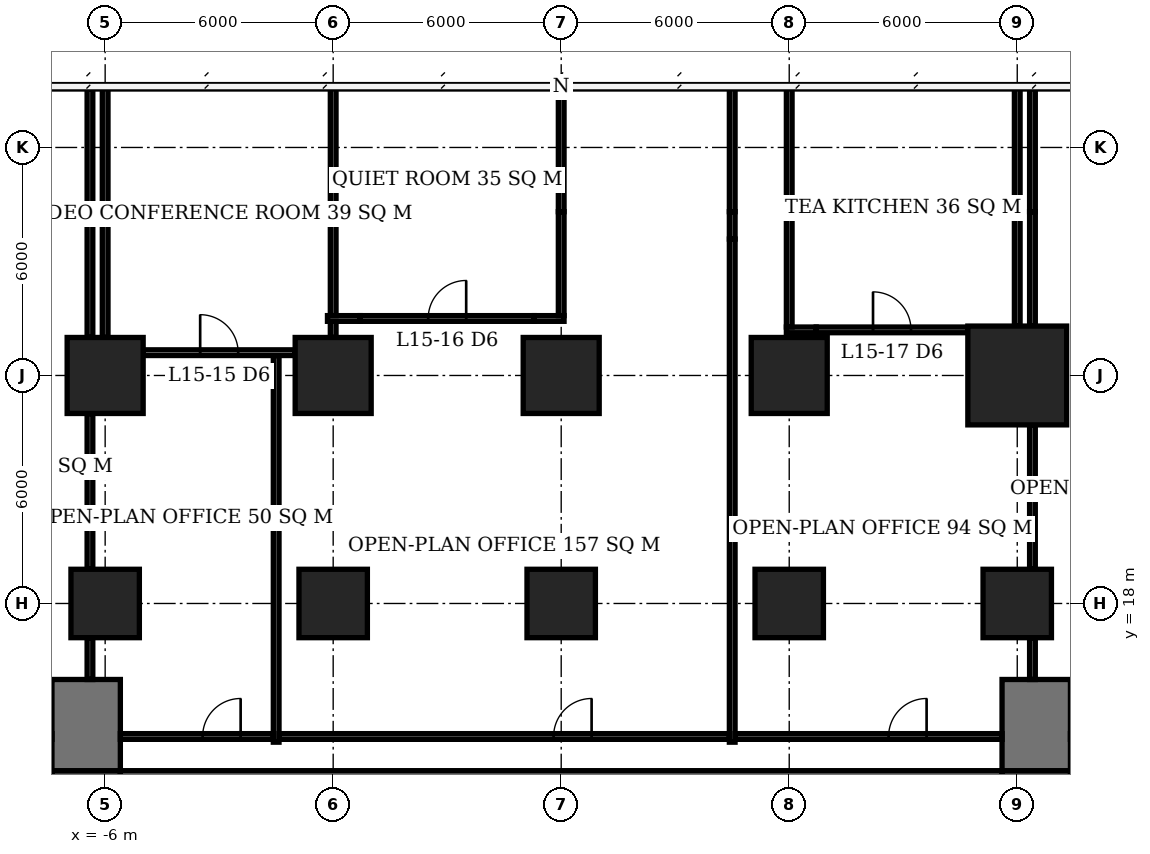
"""IFC4 building model, lengths in metres.
Left out: names, types, materials, properties, quantities, classifications, styles, units other than length and angle.
Written with IfcOpenShell. Run it as: python <this file> out.ifc"""

import sys

from ifc_helpers import new_model, si_unit, direction, frame, frame_2d, origin, origin_2d, place, context, subcontext, project, spatial, rectangle, extrude, element, fill, save


model = new_model("IFC4")
c1 = context("Model", 3, precision=1e-05, world=origin(), true_north=direction((0.0, 1.0)))
c2 = subcontext(c1, "Body", "Model", "MODEL_VIEW")
j1 = project(units=[si_unit("LENGTHUNIT", "METRE"), si_unit("PLANEANGLEUNIT", "RADIAN")], contexts=[c1])
p1 = place(None, origin())
s1 = spatial("IfcSite", under=j1, at=p1, CompositionType="ELEMENT")
p2 = place(p1, origin())
s2 = spatial("IfcBuilding", under=s1, at=p2, CompositionType="ELEMENT")
p3 = place(p2, frame((0.0, 0.0, 65.0)))
s3 = spatial("IfcBuildingStorey", under=s2, at=p3, CompositionType="ELEMENT", Elevation=65.0)
p4 = place(p3, frame((-6.0, 18.0, 0.0), z_axis=(0.0, 0.0, 1.0), x_axis=(1.0, 0.0, 0.0)))
e1 = element("IfcColumn", 1, at=p4, inside=s3, PredefinedType="COLUMN", context=c2, shape_type="SweptSolid", body=[
    extrude(rectangle(XDim=1.8, YDim=1.8, at=origin_2d()), origin(), (0.0, 0.0, 1.0), 3.9),
])
p5 = place(p3, frame((-6.0, 24.0, 0.0), z_axis=(0.0, 0.0, 1.0), x_axis=(1.0, 0.0, 0.0)))
e2 = element("IfcColumn", 2, at=p5, inside=s3, PredefinedType="COLUMN", context=c2, shape_type="SweptSolid", body=[
    extrude(rectangle(XDim=2.0, YDim=2.0, at=origin_2d()), origin(), (0.0, 0.0, 1.0), 3.9),
])
p6 = place(p3, frame((0.0, 18.0, 0.0), z_axis=(0.0, 0.0, 1.0), x_axis=(1.0, 0.0, 0.0)))
e3 = element("IfcColumn", 3, at=p6, inside=s3, PredefinedType="COLUMN", context=c2, shape_type="SweptSolid", body=[
    extrude(rectangle(XDim=1.8, YDim=1.8, at=origin_2d()), origin(), (0.0, 0.0, 1.0), 3.9),
])
p7 = place(p3, frame((0.0, 24.0, 0.0), z_axis=(0.0, 0.0, 1.0), x_axis=(1.0, 0.0, 0.0)))
e4 = element("IfcColumn", 4, at=p7, inside=s3, PredefinedType="COLUMN", context=c2, shape_type="SweptSolid", body=[
    extrude(rectangle(XDim=2.0, YDim=2.0, at=origin_2d()), origin(), (0.0, 0.0, 1.0), 3.9),
])
p8 = place(p3, frame((6.0, 18.0, 0.0), z_axis=(0.0, 0.0, 1.0), x_axis=(1.0, 0.0, 0.0)))
e5 = element("IfcColumn", 5, at=p8, inside=s3, PredefinedType="COLUMN", context=c2, shape_type="SweptSolid", body=[
    extrude(rectangle(XDim=1.8, YDim=1.8, at=origin_2d()), origin(), (0.0, 0.0, 1.0), 3.9),
])
p9 = place(p3, frame((6.0, 24.0, 0.0), z_axis=(0.0, 0.0, 1.0), x_axis=(1.0, 0.0, 0.0)))
e6 = element("IfcColumn", 6, at=p9, inside=s3, PredefinedType="COLUMN", context=c2, shape_type="SweptSolid", body=[
    extrude(rectangle(XDim=2.0, YDim=2.0, at=origin_2d()), origin(), (0.0, 0.0, 1.0), 3.9),
])
p10 = place(p3, frame((12.0, 18.0, 0.0), z_axis=(0.0, 0.0, 1.0), x_axis=(1.0, 0.0, 0.0)))
e7 = element("IfcColumn", 7, at=p10, inside=s3, PredefinedType="COLUMN", context=c2, shape_type="SweptSolid", body=[
    extrude(rectangle(XDim=1.8, YDim=1.8, at=origin_2d()), origin(), (0.0, 0.0, 1.0), 3.9),
])
p11 = place(p3, frame((12.0, 24.0, 0.0), z_axis=(0.0, 0.0, 1.0), x_axis=(1.0, 0.0, 0.0)))
e8 = element("IfcColumn", 8, at=p11, inside=s3, PredefinedType="COLUMN", context=c2, shape_type="SweptSolid", body=[
    extrude(rectangle(XDim=2.0, YDim=2.0, at=origin_2d()), origin(), (0.0, 0.0, 1.0), 3.9),
])
p12 = place(p3, frame((18.0, 18.0, 0.0), z_axis=(0.0, 0.0, 1.0), x_axis=(1.0, 0.0, 0.0)))
e9 = element("IfcColumn", 9, at=p12, inside=s3, PredefinedType="COLUMN", context=c2, shape_type="SweptSolid", body=[
    extrude(rectangle(XDim=1.8, YDim=1.8, at=origin_2d()), origin(), (0.0, 0.0, 1.0), 3.9),
])
p13 = place(p3, frame((18.0, 24.0, 0.0), z_axis=(0.0, 0.0, 1.0), x_axis=(1.0, 0.0, 0.0)))
e10 = element("IfcColumn", 10, at=p13, inside=s3, PredefinedType="COLUMN", context=c2, shape_type="SweptSolid", body=[
    extrude(rectangle(XDim=2.6, YDim=2.6, at=origin_2d()), origin(), (0.0, 0.0, 1.0), 3.9),
])
p14 = place(p3, frame((-5.6, 12.6, 0.0), z_axis=(0.0, 0.0, 1.0), x_axis=(1.0, 0.0, 0.0)))
e11 = element("IfcWall", 11, at=p14, inside=s3, PredefinedType="SHEAR", context=c2, shape_type="SweptSolid", body=[
    extrude(rectangle(XDim=23.2, YDim=2.0, at=frame_2d((11.6, 0.0))), origin(), (0.0, 0.0, 1.0), 3.9),
])
p15 = place(p3, frame((-6.5, -7.6, 0.0), z_axis=(0.0, 0.0, 1.0), x_axis=(0.0, 1.0, 0.0)))
e12 = element("IfcWall", 12, at=p15, inside=s3, PredefinedType="SHEAR", context=c2, shape_type="SweptSolid", body=[
    extrude(rectangle(XDim=21.2, YDim=1.8, at=frame_2d((10.6, 0.0))), origin(), (0.0, 0.0, 1.0), 3.9),
])
p16 = place(p15, frame((7.8, 0.0, 0.0)))
e13 = element("IfcOpeningElement", 13, at=p16, cuts=e12, PredefinedType="OPENING", context=c2, shape_type="SweptSolid", body=[
    extrude(rectangle(XDim=1.8, YDim=2.4, at=frame_2d((0.9, 1.2))), frame((0.0, 0.91, 0.0), z_axis=(0.0, -1.0, 0.0), x_axis=(1.0, 0.0, 0.0)), (0.0, 0.0, 1.0), 1.82),
])
p17 = place(p3, frame((18.5, -7.6, 0.0), z_axis=(0.0, 0.0, 1.0), x_axis=(0.0, 1.0, 0.0)))
e14 = element("IfcWall", 14, at=p17, inside=s3, PredefinedType="SHEAR", context=c2, shape_type="SweptSolid", body=[
    extrude(rectangle(XDim=21.2, YDim=1.8, at=frame_2d((10.6, 0.0))), origin(), (0.0, 0.0, 1.0), 3.9),
])
p18 = place(p17, frame((9.2, 0.0, 0.0)))
e15 = element("IfcOpeningElement", 15, at=p18, cuts=e14, PredefinedType="OPENING", context=c2, shape_type="SweptSolid", body=[
    extrude(rectangle(XDim=1.8, YDim=2.4, at=frame_2d((0.9, 1.2))), frame((0.0, 0.91, 0.0), z_axis=(0.0, -1.0, 0.0), x_axis=(1.0, 0.0, 0.0)), (0.0, 0.0, 1.0), 1.82),
])
for number, where, z_axis, x_axis in (
    (16, (-6.5, 13.6, 0.0), (0.0, 0.0, 1.0), (0.0, 1.0, 0.0)),
    (17, (18.5, 13.6, 0.0), (0.0, 0.0, 1.0), (0.0, 1.0, 0.0)),
):
    element("IfcWall", number, at=place(p3, frame(where, z_axis=z_axis, x_axis=x_axis)), inside=s3, PredefinedType="SHEAR", context=c2, shape_type="SweptSolid", body=[
        extrude(rectangle(XDim=2.4, YDim=1.8, at=frame_2d((1.2, 0.0))), origin(), (0.0, 0.0, 1.0), 3.9),
    ])
p19 = place(p3, frame((-5.0, 24.6, 0.0), z_axis=(0.0, 0.0, 1.0), x_axis=(1.0, 0.0, 0.0)))
e18 = element("IfcWall", 18, at=p19, inside=s3, PredefinedType="PARTITIONING", context=c2, shape_type="SweptSolid", body=[
    extrude(rectangle(XDim=4.0, YDim=0.15, at=frame_2d((2.0, 0.0))), origin(), (0.0, 0.0, 1.0), 3.65),
])
p20 = place(p19, frame((1.5, 0.0, 0.0)))
e19 = element("IfcOpeningElement", 19, at=p20, cuts=e18, PredefinedType="OPENING", context=c2, shape_type="SweptSolid", body=[
    extrude(rectangle(XDim=1.0, YDim=2.1, at=frame_2d((0.5, 1.05))), frame((0.0, 0.085, 0.0), z_axis=(0.0, -1.0, 0.0), x_axis=(1.0, 0.0, 0.0)), (0.0, 0.0, 1.0), 0.17),
])
p21 = place(p3, frame((11.925, 25.2, 0.0), z_axis=(0.0, 0.0, 1.0), x_axis=(1.0, 0.0, 0.0)))
e20 = element("IfcWall", 20, at=p21, inside=s3, PredefinedType="PARTITIONING", context=c2, shape_type="SweptSolid", body=[
    extrude(rectangle(XDim=0.785, YDim=0.15, at=frame_2d((0.393, 0.0))), origin(), (0.0, 0.0, 1.0), 2.65),
])
p22 = place(p3, frame((12.71, 25.2, 0.0), z_axis=(0.0, 0.0, 1.0), x_axis=(1.0, 0.0, 0.0)))
e21 = element("IfcWall", 21, at=p22, inside=s3, PredefinedType="PARTITIONING", context=c2, shape_type="SweptSolid", body=[
    extrude(rectangle(XDim=3.99, YDim=0.15, at=frame_2d((1.995, 0.0))), origin(), (0.0, 0.0, 1.0), 3.65),
])
p23 = place(p22, frame((1.495, 0.0, 0.0)))
e22 = element("IfcOpeningElement", 22, at=p23, cuts=e21, PredefinedType="OPENING", context=c2, shape_type="SweptSolid", body=[
    extrude(rectangle(XDim=1.0, YDim=2.1, at=frame_2d((0.5, 1.05))), frame((0.0, 0.085, 0.0), z_axis=(0.0, -1.0, 0.0), x_axis=(1.0, 0.0, 0.0)), (0.0, 0.0, 1.0), 0.17),
])
p24 = place(p3, frame((-0.15, 25.5, 0.0), z_axis=(0.0, 0.0, 1.0), x_axis=(1.0, 0.0, 0.0)))
e23 = element("IfcWall", 23, at=p24, inside=s3, PredefinedType="PARTITIONING", context=c2, shape_type="SweptSolid", body=[
    extrude(rectangle(XDim=0.86, YDim=0.15, at=frame_2d((0.43, 0.0))), origin(), (0.0, 0.0, 1.0), 2.65),
])
p25 = place(p3, frame((0.71, 25.5, 0.0), z_axis=(0.0, 0.0, 1.0), x_axis=(1.0, 0.0, 0.0)))
e24 = element("IfcWall", 24, at=p25, inside=s3, PredefinedType="PARTITIONING", context=c2, shape_type="SweptSolid", body=[
    extrude(rectangle(XDim=4.58, YDim=0.15, at=frame_2d((2.29, 0.0))), origin(), (0.0, 0.0, 1.0), 3.65),
])
p26 = place(p25, frame((1.79, 0.0, 0.0)))
e25 = element("IfcOpeningElement", 25, at=p26, cuts=e24, PredefinedType="OPENING", context=c2, shape_type="SweptSolid", body=[
    extrude(rectangle(XDim=1.0, YDim=2.1, at=frame_2d((0.5, 1.05))), frame((0.0, 0.085, 0.0), z_axis=(0.0, -1.0, 0.0), x_axis=(1.0, 0.0, 0.0)), (0.0, 0.0, 1.0), 0.17),
])
p27 = place(p3, frame((5.29, 25.5, 0.0), z_axis=(0.0, 0.0, 1.0), x_axis=(1.0, 0.0, 0.0)))
e26 = element("IfcWall", 26, at=p27, inside=s3, PredefinedType="PARTITIONING", context=c2, shape_type="SweptSolid", body=[
    extrude(rectangle(XDim=0.785, YDim=0.15, at=frame_2d((0.393, 0.0))), origin(), (0.0, 0.0, 1.0), 2.65),
])
p28 = place(p3, frame((-6.0, 25.0, 0.0), z_axis=(0.0, 0.0, 1.0), x_axis=(0.0, 1.0, 0.0)))
e27 = element("IfcWall", 27, at=p28, inside=s3, PredefinedType="PARTITIONING", context=c2, shape_type="SweptSolid", body=[
    extrude(rectangle(XDim=3.31, YDim=0.15, at=frame_2d((1.655, 0.0))), origin(), (0.0, 0.0, 1.0), 2.65),
])
p29 = place(p3, frame((-6.0, 28.31, 0.0), z_axis=(0.0, 0.0, 1.0), x_axis=(0.0, 1.0, 0.0)))
e28 = element("IfcWall", 28, at=p29, inside=s3, PredefinedType="PARTITIONING", context=c2, shape_type="SweptSolid", body=[
    extrude(rectangle(XDim=3.29, YDim=0.15, at=frame_2d((1.645, 0.0))), origin(), (0.0, 0.0, 1.0), 3.65),
])
p30 = place(p3, frame((0.0, 25.0, 0.0), z_axis=(0.0, 0.0, 1.0), x_axis=(0.0, 1.0, 0.0)))
e29 = element("IfcWall", 29, at=p30, inside=s3, PredefinedType="PARTITIONING", context=c2, shape_type="SweptSolid", body=[
    extrude(rectangle(XDim=0.425, YDim=0.15, at=frame_2d((0.212, 0.0))), origin(), (0.0, 0.0, 1.0), 2.65),
])
p31 = place(p3, frame((0.0, 25.575, 0.0), z_axis=(0.0, 0.0, 1.0), x_axis=(0.0, 1.0, 0.0)))
e30 = element("IfcWall", 30, at=p31, inside=s3, PredefinedType="PARTITIONING", context=c2, shape_type="SweptSolid", body=[
    extrude(rectangle(XDim=2.735, YDim=0.15, at=frame_2d((1.368, 0.0))), origin(), (0.0, 0.0, 1.0), 2.65),
])
p32 = place(p3, frame((0.0, 28.31, 0.0), z_axis=(0.0, 0.0, 1.0), x_axis=(0.0, 1.0, 0.0)))
e31 = element("IfcWall", 31, at=p32, inside=s3, PredefinedType="PARTITIONING", context=c2, shape_type="SweptSolid", body=[
    extrude(rectangle(XDim=3.29, YDim=0.15, at=frame_2d((1.645, 0.0))), origin(), (0.0, 0.0, 1.0), 3.65),
])
p33 = place(p3, frame((6.0, 25.575, 0.0), z_axis=(0.0, 0.0, 1.0), x_axis=(0.0, 1.0, 0.0)))
e32 = element("IfcWall", 32, at=p33, inside=s3, PredefinedType="PARTITIONING", context=c2, shape_type="SweptSolid", body=[
    extrude(rectangle(XDim=2.735, YDim=0.15, at=frame_2d((1.368, 0.0))), origin(), (0.0, 0.0, 1.0), 2.65),
])
p34 = place(p3, frame((6.0, 28.31, 0.0), z_axis=(0.0, 0.0, 1.0), x_axis=(0.0, 1.0, 0.0)))
e33 = element("IfcWall", 33, at=p34, inside=s3, PredefinedType="PARTITIONING", context=c2, shape_type="SweptSolid", body=[
    extrude(rectangle(XDim=3.24, YDim=0.15, at=frame_2d((1.62, 0.0))), origin(), (0.0, 0.0, 1.0), 3.65),
])
p35 = place(p3, frame((12.0, 25.275, 0.0), z_axis=(0.0, 0.0, 1.0), x_axis=(0.0, 1.0, 0.0)))
e34 = element("IfcWall", 34, at=p35, inside=s3, PredefinedType="PARTITIONING", context=c2, shape_type="SweptSolid", body=[
    extrude(rectangle(XDim=3.035, YDim=0.15, at=frame_2d((1.518, 0.0))), origin(), (0.0, 0.0, 1.0), 2.65),
])
p36 = place(p3, frame((12.0, 28.31, 0.0), z_axis=(0.0, 0.0, 1.0), x_axis=(0.0, 1.0, 0.0)))
e35 = element("IfcWall", 35, at=p36, inside=s3, PredefinedType="PARTITIONING", context=c2, shape_type="SweptSolid", body=[
    extrude(rectangle(XDim=3.29, YDim=0.15, at=frame_2d((1.645, 0.0))), origin(), (0.0, 0.0, 1.0), 3.65),
])
p37 = place(p3, frame((18.0, 25.3, 0.0), z_axis=(0.0, 0.0, 1.0), x_axis=(0.0, 1.0, 0.0)))
e36 = element("IfcWall", 36, at=p37, inside=s3, PredefinedType="PARTITIONING", context=c2, shape_type="SweptSolid", body=[
    extrude(rectangle(XDim=3.01, YDim=0.15, at=frame_2d((1.505, 0.0))), origin(), (0.0, 0.0, 1.0), 2.65),
])
p38 = place(p3, frame((18.0, 28.31, 0.0), z_axis=(0.0, 0.0, 1.0), x_axis=(0.0, 1.0, 0.0)))
e37 = element("IfcWall", 37, at=p38, inside=s3, PredefinedType="PARTITIONING", context=c2, shape_type="SweptSolid", body=[
    extrude(rectangle(XDim=3.29, YDim=0.15, at=frame_2d((1.645, 0.0))), origin(), (0.0, 0.0, 1.0), 3.65),
])
p39 = place(p3, frame((-6.4, 16.0, 0.0), z_axis=(0.0, 0.0, 1.0), x_axis=(0.0, 1.0, 0.0)))
e38 = element("IfcWall", 38, at=p39, inside=s3, PredefinedType="PARTITIONING", context=c2, shape_type="SweptSolid", body=[
    extrude(rectangle(XDim=1.1, YDim=0.15, at=frame_2d((0.55, 0.0))), origin(), (0.0, 0.0, 1.0), 3.65),
])
p40 = place(p3, frame((-6.4, 18.9, 0.0), z_axis=(0.0, 0.0, 1.0), x_axis=(0.0, 1.0, 0.0)))
e39 = element("IfcWall", 39, at=p40, inside=s3, PredefinedType="PARTITIONING", context=c2, shape_type="SweptSolid", body=[
    extrude(rectangle(XDim=4.1, YDim=0.15, at=frame_2d((2.05, 0.0))), origin(), (0.0, 0.0, 1.0), 3.65),
])
p41 = place(p3, frame((-6.4, 25.0, 0.0), z_axis=(0.0, 0.0, 1.0), x_axis=(0.0, 1.0, 0.0)))
e40 = element("IfcWall", 40, at=p41, inside=s3, PredefinedType="PARTITIONING", context=c2, shape_type="SweptSolid", body=[
    extrude(rectangle(XDim=3.31, YDim=0.15, at=frame_2d((1.655, 0.0))), origin(), (0.0, 0.0, 1.0), 2.65),
])
p42 = place(p3, frame((-6.4, 28.31, 0.0), z_axis=(0.0, 0.0, 1.0), x_axis=(0.0, 1.0, 0.0)))
e41 = element("IfcWall", 41, at=p42, inside=s3, PredefinedType="PARTITIONING", context=c2, shape_type="SweptSolid", body=[
    extrude(rectangle(XDim=3.24, YDim=0.15, at=frame_2d((1.62, 0.0))), origin(), (0.0, 0.0, 1.0), 3.65),
])
p43 = place(p3, frame((-5.6, 14.5, 0.0), z_axis=(0.0, 0.0, 1.0), x_axis=(1.0, 0.0, 0.0)))
e42 = element("IfcWall", 42, at=p43, inside=s3, PredefinedType="PARTITIONING", context=c2, shape_type="SweptSolid", body=[
    extrude(rectangle(XDim=4.025, YDim=0.15, at=frame_2d((2.013, 0.0))), origin(), (0.0, 0.0, 1.0), 3.65),
])
p44 = place(p43, frame((2.165, 0.0, 0.0)))
e43 = element("IfcOpeningElement", 43, at=p44, cuts=e42, PredefinedType="OPENING", context=c2, shape_type="SweptSolid", body=[
    extrude(rectangle(XDim=1.0, YDim=2.1, at=frame_2d((0.5, 1.05))), frame((0.0, 0.085, 0.0), z_axis=(0.0, -1.0, 0.0), x_axis=(1.0, 0.0, 0.0)), (0.0, 0.0, 1.0), 0.17),
])
p45 = place(p3, frame((-1.5, 14.35, 0.0), z_axis=(0.0, 0.0, 1.0), x_axis=(0.0, 1.0, 0.0)))
e44 = element("IfcWall", 44, at=p45, inside=s3, PredefinedType="PARTITIONING", context=c2, shape_type="SweptSolid", body=[
    extrude(rectangle(XDim=10.175, YDim=0.15, at=frame_2d((5.087, 0.0))), origin(), (0.0, 0.0, 1.0), 3.65),
])
p46 = place(p3, frame((-1.425, 14.5, 0.0), z_axis=(0.0, 0.0, 1.0), x_axis=(1.0, 0.0, 0.0)))
e45 = element("IfcWall", 45, at=p46, inside=s3, PredefinedType="PARTITIONING", context=c2, shape_type="SweptSolid", body=[
    extrude(rectangle(XDim=11.85, YDim=0.15, at=frame_2d((5.925, 0.0))), origin(), (0.0, 0.0, 1.0), 3.65),
])
p47 = place(p46, frame((7.225, 0.0, 0.0)))
e46 = element("IfcOpeningElement", 46, at=p47, cuts=e45, PredefinedType="OPENING", context=c2, shape_type="SweptSolid", body=[
    extrude(rectangle(XDim=1.0, YDim=2.1, at=frame_2d((0.5, 1.05))), frame((0.0, 0.085, 0.0), z_axis=(0.0, -1.0, 0.0), x_axis=(1.0, 0.0, 0.0)), (0.0, 0.0, 1.0), 0.17),
])
p48 = place(p3, frame((10.5, 14.35, 0.0), z_axis=(0.0, 0.0, 1.0), x_axis=(0.0, 1.0, 0.0)))
e47 = element("IfcWall", 47, at=p48, inside=s3, PredefinedType="PARTITIONING", context=c2, shape_type="SweptSolid", body=[
    extrude(rectangle(XDim=13.24, YDim=0.15, at=frame_2d((6.62, 0.0))), origin(), (0.0, 0.0, 1.0), 3.65),
])
p49 = place(p3, frame((10.5, 27.59, 0.0), z_axis=(0.0, 0.0, 1.0), x_axis=(0.0, 1.0, 0.0)))
e48 = element("IfcWall", 48, at=p49, inside=s3, PredefinedType="PARTITIONING", context=c2, shape_type="SweptSolid", body=[
    extrude(rectangle(XDim=0.72, YDim=0.15, at=frame_2d((0.36, 0.0))), origin(), (0.0, 0.0, 1.0), 2.65),
])
p50 = place(p3, frame((10.5, 28.31, 0.0), z_axis=(0.0, 0.0, 1.0), x_axis=(0.0, 1.0, 0.0)))
e49 = element("IfcWall", 49, at=p50, inside=s3, PredefinedType="PARTITIONING", context=c2, shape_type="SweptSolid", body=[
    extrude(rectangle(XDim=3.29, YDim=0.15, at=frame_2d((1.645, 0.0))), origin(), (0.0, 0.0, 1.0), 3.65),
])
p51 = place(p3, frame((10.575, 14.5, 0.0), z_axis=(0.0, 0.0, 1.0), x_axis=(1.0, 0.0, 0.0)))
e50 = element("IfcWall", 50, at=p51, inside=s3, PredefinedType="PARTITIONING", context=c2, shape_type="SweptSolid", body=[
    extrude(rectangle(XDim=7.025, YDim=0.15, at=frame_2d((3.513, 0.0))), origin(), (0.0, 0.0, 1.0), 3.65),
])
p52 = place(p51, frame((4.04, 0.0, 0.0)))
e51 = element("IfcOpeningElement", 51, at=p52, cuts=e50, PredefinedType="OPENING", context=c2, shape_type="SweptSolid", body=[
    extrude(rectangle(XDim=1.0, YDim=2.1, at=frame_2d((0.5, 1.05))), frame((0.0, 0.085, 0.0), z_axis=(0.0, -1.0, 0.0), x_axis=(1.0, 0.0, 0.0)), (0.0, 0.0, 1.0), 0.17),
])
p53 = place(p3, frame((18.4, 16.0, 0.0), z_axis=(0.0, 0.0, 1.0), x_axis=(0.0, 1.0, 0.0)))
e52 = element("IfcWall", 52, at=p53, inside=s3, PredefinedType="PARTITIONING", context=c2, shape_type="SweptSolid", body=[
    extrude(rectangle(XDim=1.1, YDim=0.15, at=frame_2d((0.55, 0.0))), origin(), (0.0, 0.0, 1.0), 3.65),
])
p54 = place(p3, frame((18.4, 18.9, 0.0), z_axis=(0.0, 0.0, 1.0), x_axis=(0.0, 1.0, 0.0)))
e53 = element("IfcWall", 53, at=p54, inside=s3, PredefinedType="PARTITIONING", context=c2, shape_type="SweptSolid", body=[
    extrude(rectangle(XDim=3.8, YDim=0.15, at=frame_2d((1.9, 0.0))), origin(), (0.0, 0.0, 1.0), 3.65),
])
p55 = place(p3, frame((18.4, 25.3, 0.0), z_axis=(0.0, 0.0, 1.0), x_axis=(0.0, 1.0, 0.0)))
e54 = element("IfcWall", 54, at=p55, inside=s3, PredefinedType="PARTITIONING", context=c2, shape_type="SweptSolid", body=[
    extrude(rectangle(XDim=3.01, YDim=0.15, at=frame_2d((1.505, 0.0))), origin(), (0.0, 0.0, 1.0), 2.65),
])
p56 = place(p3, frame((18.4, 28.31, 0.0), z_axis=(0.0, 0.0, 1.0), x_axis=(0.0, 1.0, 0.0)))
e55 = element("IfcWall", 55, at=p56, inside=s3, PredefinedType="PARTITIONING", context=c2, shape_type="SweptSolid", body=[
    extrude(rectangle(XDim=3.24, YDim=0.15, at=frame_2d((1.62, 0.0))), origin(), (0.0, 0.0, 1.0), 3.65),
])
p57 = place(p3, frame((19.4, 14.5, 0.0), z_axis=(0.0, 0.0, 1.0), x_axis=(1.0, 0.0, 0.0)))
e56 = element("IfcWall", 56, at=p57, inside=s3, PredefinedType="PARTITIONING", context=c2, shape_type="SweptSolid", body=[
    extrude(rectangle(XDim=1.175, YDim=0.15, at=frame_2d((0.587, 0.0))), origin(), (0.0, 0.0, 1.0), 3.65),
])
p58 = place(p20, origin())
e57 = element("IfcDoor", 57, at=p58, inside=s3, OperationType="SINGLE_SWING_LEFT", PredefinedType="DOOR", context=c2, shape_type="SweptSolid", body=[
    extrude(rectangle(XDim=1.0, YDim=2.1, at=frame_2d((0.5, 1.05))), frame((0.0, 0.025, 0.0), z_axis=(0.0, -1.0, 0.0), x_axis=(1.0, 0.0, 0.0)), (0.0, 0.0, 1.0), 0.05),
])
fill(e19, e57)
p59 = place(p26, origin())
e58 = element("IfcDoor", 58, at=p59, inside=s3, OperationType="SINGLE_SWING_RIGHT", PredefinedType="DOOR", context=c2, shape_type="SweptSolid", body=[
    extrude(rectangle(XDim=1.0, YDim=2.1, at=frame_2d((0.5, 1.05))), frame((0.0, 0.025, 0.0), z_axis=(0.0, -1.0, 0.0), x_axis=(1.0, 0.0, 0.0)), (0.0, 0.0, 1.0), 0.05),
])
fill(e25, e58)
p60 = place(p23, origin())
e59 = element("IfcDoor", 59, at=p60, inside=s3, OperationType="SINGLE_SWING_LEFT", PredefinedType="DOOR", context=c2, shape_type="SweptSolid", body=[
    extrude(rectangle(XDim=1.0, YDim=2.1, at=frame_2d((0.5, 1.05))), frame((0.0, 0.025, 0.0), z_axis=(0.0, -1.0, 0.0), x_axis=(1.0, 0.0, 0.0)), (0.0, 0.0, 1.0), 0.05),
])
fill(e22, e59)
p61 = place(p44, origin())
e60 = element("IfcDoor", 60, at=p61, inside=s3, OperationType="SINGLE_SWING_RIGHT", PredefinedType="DOOR", context=c2, shape_type="SweptSolid", body=[
    extrude(rectangle(XDim=1.0, YDim=2.1, at=frame_2d((0.5, 1.05))), frame((0.0, 0.025, 0.0), z_axis=(0.0, -1.0, 0.0), x_axis=(1.0, 0.0, 0.0)), (0.0, 0.0, 1.0), 0.05),
])
fill(e43, e60)
p62 = place(p52, origin())
e61 = element("IfcDoor", 61, at=p62, inside=s3, OperationType="SINGLE_SWING_RIGHT", PredefinedType="DOOR", context=c2, shape_type="SweptSolid", body=[
    extrude(rectangle(XDim=1.0, YDim=2.1, at=frame_2d((0.5, 1.05))), frame((0.0, 0.025, 0.0), z_axis=(0.0, -1.0, 0.0), x_axis=(1.0, 0.0, 0.0)), (0.0, 0.0, 1.0), 0.05),
])
fill(e51, e61)
p63 = place(p47, origin())
e62 = element("IfcDoor", 62, at=p63, inside=s3, OperationType="SINGLE_SWING_RIGHT", PredefinedType="DOOR", context=c2, shape_type="SweptSolid", body=[
    extrude(rectangle(XDim=1.0, YDim=2.1, at=frame_2d((0.5, 1.05))), frame((0.0, 0.025, 0.0), z_axis=(0.0, -1.0, 0.0), x_axis=(1.0, 0.0, 0.0)), (0.0, 0.0, 1.0), 0.05),
])
fill(e46, e62)
save(model, sys.argv[1])
